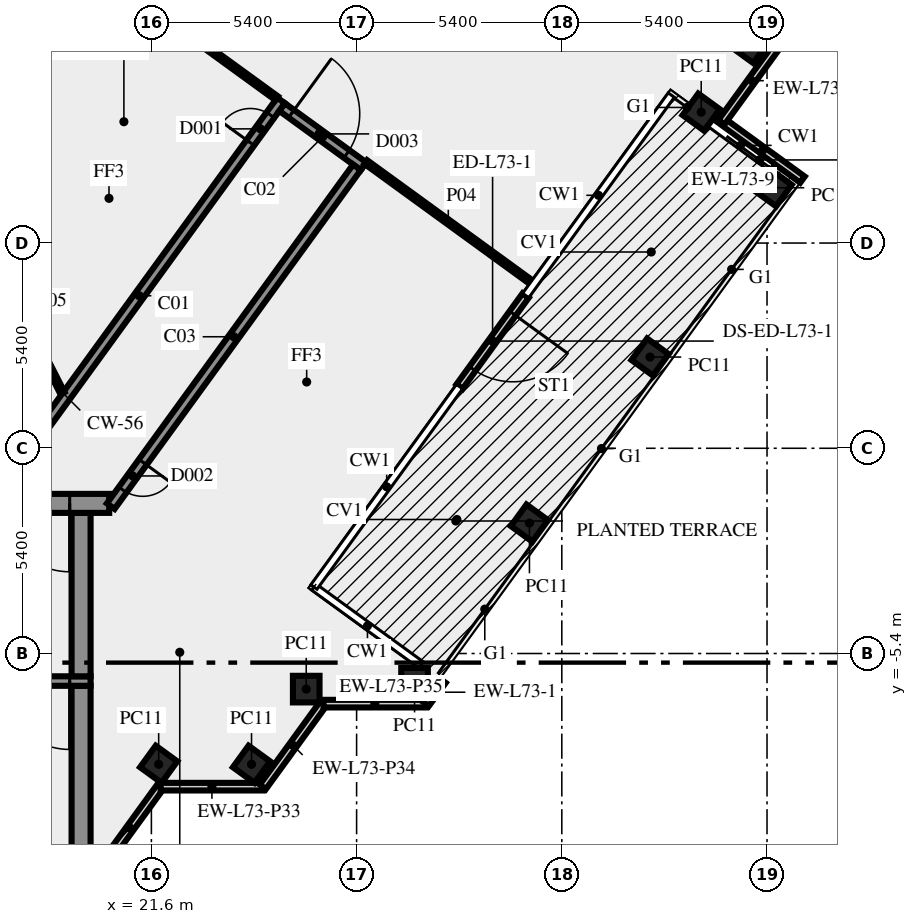
"""IFC4 building model, lengths in metres.
Left out: names, types, materials, properties, quantities, classifications, styles, units other than length and angle.
Written with IfcOpenShell. Run it as: python <this file> out.ifc"""

import sys

from ifc_helpers import new_model, si_unit, direction, frame, frame_2d, origin, origin_2d, place, context, subcontext, project, spatial, rectangle, extrude, element, fill, save


model = new_model("IFC4")
c1 = context("Model", 3, precision=1e-05, world=origin(), true_north=direction((0.0, 1.0)))
c2 = subcontext(c1, "Body", "Model", "MODEL_VIEW")
j1 = project(units=[si_unit("LENGTHUNIT", "METRE"), si_unit("PLANEANGLEUNIT", "RADIAN")], contexts=[c1])
p1 = place(None, origin())
s1 = spatial("IfcSite", under=j1, at=p1, CompositionType="ELEMENT")
p2 = place(p1, origin())
s2 = spatial("IfcBuilding", under=s1, at=p2, CompositionType="ELEMENT")
p3 = place(p2, frame((0.0, 0.0, 315.0)))
s3 = spatial("IfcBuildingStorey", under=s2, at=p3, CompositionType="ELEMENT", Elevation=315.0)
for number, where, z_axis, x_axis in (
    (1, (21.792, -8.315, 0.0), (0.0, 0.0, 1.0), (0.588, 0.809, 0.0)),
    (2, (24.235, -8.315, 0.0), (0.0, 0.0, 1.0), (0.588, 0.809, 0.0)),
    (3, (25.674, -6.337, 0.0), (0.0, 0.0, 1.0), (1.0, 0.0, 0.0)),
    (4, (28.525, -6.13, 0.0), (0.0, 0.0, 1.0), (1.0, 0.0, 0.0)),
    (5, (31.548, -1.969, 0.0), (0.0, 0.0, 1.0), (0.588, 0.809, 0.0)),
    (6, (34.722, 2.4, 0.0), (0.0, 0.0, 1.0), (0.588, 0.809, 0.0)),
    (7, (37.96, 6.855, 0.0), (0.0, 0.0, 1.0), (0.588, 0.809, 0.0)),
    (8, (36.068, 8.844, 0.0), (0.0, 0.0, 1.0), (0.588, 0.809, 0.0)),
    (9, (37.36, 10.625, 0.0), (0.0, 0.0, 1.0), (0.588, 0.809, 0.0)),
):
    element("IfcColumn", number, at=place(p3, frame(where, z_axis=z_axis, x_axis=x_axis)), inside=s3, PredefinedType="COLUMN", context=c2, shape_type="SweptSolid", body=[
        extrude(rectangle(XDim=0.7, YDim=0.7, at=origin_2d()), origin(), (0.0, 0.0, 1.0), 3.65),
    ])
p4 = place(p3, frame((20.253, -11.083, 0.0), z_axis=(0.0, 0.0, 1.0), x_axis=(0.587766567315, 0.809030569476, 0.0)))
e10 = element("IfcWall", 10, at=p4, inside=s3, PredefinedType="SOLIDWALL", context=c2, shape_type="SweptSolid", body=[
    extrude(rectangle(XDim=2.688, YDim=0.2, at=frame_2d((1.344, 0.0))), origin(), (0.0, 0.0, 1.0), 3.65),
])
p5 = place(p3, frame((21.843, -8.904, 0.0), z_axis=(0.0, 0.0, 1.0), x_axis=(1.0, 0.0, 0.0)))
e11 = element("IfcWall", 11, at=p5, inside=s3, PredefinedType="SOLIDWALL", context=c2, shape_type="SweptSolid", body=[
    extrude(rectangle(XDim=2.7, YDim=0.2, at=frame_2d((1.35, 0.0))), origin(), (0.0, 0.0, 1.0), 3.65),
])
p6 = place(p3, frame((24.533, -8.909, 0.0), z_axis=(0.0, 0.0, 1.0), x_axis=(0.587720002413, 0.809064397168, 0.0)))
e12 = element("IfcWall", 12, at=p6, inside=s3, PredefinedType="SOLIDWALL", context=c2, shape_type="SweptSolid", body=[
    extrude(rectangle(XDim=2.7, YDim=0.2, at=frame_2d((1.35, 0.0))), origin(), (0.0, 0.0, 1.0), 3.65),
])
p7 = place(p3, frame((26.13, -6.719, 0.0), z_axis=(0.0, 0.0, 1.0), x_axis=(1.0, 0.0, 0.0)))
e13 = element("IfcWall", 13, at=p7, inside=s3, PredefinedType="SOLIDWALL", context=c2, shape_type="SweptSolid", body=[
    extrude(rectangle(XDim=2.7, YDim=0.2, at=frame_2d((1.35, 0.0))), origin(), (0.0, 0.0, 1.0), 3.65),
])
p8 = place(p3, frame((28.82, -6.724, 0.0), z_axis=(0.0, 0.0, 1.0), x_axis=(0.587941177097, 0.808903685412, 0.0)))
e14 = element("IfcWall", 14, at=p8, inside=s3, PredefinedType="SOLIDWALL", context=c2, shape_type="SweptSolid", body=[
    extrude(rectangle(XDim=0.756, YDim=0.2, at=frame_2d((0.378, 0.0))), origin(), (0.0, 0.0, 1.0), 3.65),
])
p9 = place(p3, frame((31.449, 4.019, 0.0), z_axis=(0.0, 0.0, 1.0), x_axis=(-0.58782869016, -0.808985433135, 0.0)))
e15 = element("IfcWall", 15, at=p9, inside=s3, PredefinedType="SOLIDWALL", context=c2, shape_type="SweptSolid", body=[
    extrude(rectangle(XDim=2.963, YDim=0.2, at=frame_2d((1.481, 0.0))), origin(), (0.0, 0.0, 1.0), 3.65),
])
p10 = place(p9, frame((0.582, 0.0, 0.0)))
e16 = element("IfcOpeningElement", 16, at=p10, cuts=e15, PredefinedType="OPENING", context=c2, shape_type="SweptSolid", body=[
    extrude(rectangle(XDim=1.8, YDim=2.4, at=frame_2d((0.9, 1.2))), frame((0.0, 0.11, 0.0), z_axis=(0.0, -1.0, 0.0), x_axis=(1.0, 0.0, 0.0)), (0.0, 0.0, 1.0), 0.22),
])
p11 = place(p3, frame((38.733, 7.069, 0.0), z_axis=(0.0, 0.0, 1.0), x_axis=(-0.80901210161, 0.587791986546, 0.0)))
e17 = element("IfcWall", 17, at=p11, inside=s3, PredefinedType="SOLIDWALL", context=c2, shape_type="SweptSolid", body=[
    extrude(rectangle(XDim=2.6, YDim=0.2, at=frame_2d((1.3, 0.0))), origin(), (0.0, 0.0, 1.0), 3.65),
])
p12 = place(p3, frame((36.602, 8.58, 0.0), z_axis=(0.0, 0.0, 1.0), x_axis=(0.587822180636, 0.808990163075, 0.0)))
e18 = element("IfcWall", 18, at=p12, inside=s3, PredefinedType="SOLIDWALL", context=c2, shape_type="SweptSolid", body=[
    extrude(rectangle(XDim=2.7, YDim=0.2, at=frame_2d((1.35, 0.0))), origin(), (0.0, 0.0, 1.0), 3.65),
])
p13 = place(p3, frame((19.75, -10.5, 0.0), z_axis=(0.0, 0.0, 1.0), x_axis=(0.0, 1.0, 0.0)))
e19 = element("IfcWall", 19, at=p13, inside=s3, PredefinedType="SHEAR", context=c2, shape_type="SweptSolid", body=[
    extrude(rectangle(XDim=4.25, YDim=0.5, at=frame_2d((2.125, 0.0))), origin(), (0.0, 0.0, 1.0), 3.65),
])
p14 = place(p3, frame((20.0, -6.125, 0.0), z_axis=(0.0, 0.0, 1.0), x_axis=(-1.0, 0.0, 0.0)))
e20 = element("IfcWall", 20, at=p14, inside=s3, PredefinedType="SHEAR", context=c2, shape_type="SweptSolid", body=[
    extrude(rectangle(XDim=10.2, YDim=0.25, at=frame_2d((5.1, 0.0))), origin(), (0.0, 0.0, 1.0), 3.65),
])
p15 = place(p14, frame((0.55, 0.0, 0.0)))
e21 = element("IfcOpeningElement", 21, at=p15, cuts=e20, PredefinedType="OPENING", context=c2, shape_type="SweptSolid", body=[
    extrude(rectangle(XDim=1.8, YDim=2.1, at=frame_2d((0.9, 1.05))), frame((0.0, 0.135, 0.0), z_axis=(0.0, -1.0, 0.0), x_axis=(1.0, 0.0, 0.0)), (0.0, 0.0, 1.0), 0.27),
])
p16 = place(p3, frame((19.75, -6.0, 0.0), z_axis=(0.0, 0.0, 1.0), x_axis=(0.0, 1.0, 0.0)))
e22 = element("IfcWall", 22, at=p16, inside=s3, PredefinedType="SHEAR", context=c2, shape_type="SweptSolid", body=[
    extrude(rectangle(XDim=4.3, YDim=0.5, at=frame_2d((2.15, 0.0))), origin(), (0.0, 0.0, 1.0), 3.65),
])
p17 = place(p3, frame((20.49, -1.45, 0.0), z_axis=(0.0, 0.0, 1.0), x_axis=(-1.0, 0.0, 0.0)))
e23 = element("IfcWall", 23, at=p17, inside=s3, PredefinedType="SHEAR", context=c2, shape_type="SweptSolid", body=[
    extrude(rectangle(XDim=40.98, YDim=0.5, at=frame_2d((20.49, 0.0))), origin(), (0.0, 0.0, 1.0), 3.65),
])
p18 = place(p17, frame((38.14, 0.0, 0.0)))
e24 = element("IfcOpeningElement", 24, at=p18, cuts=e23, PredefinedType="OPENING", context=c2, shape_type="SweptSolid", body=[
    extrude(rectangle(XDim=1.8, YDim=2.1, at=frame_2d((0.9, 1.05))), frame((0.0, 0.26, 0.0), z_axis=(0.0, -1.0, 0.0), x_axis=(1.0, 0.0, 0.0)), (0.0, 0.0, 1.0), 0.52),
])
p19 = place(p17, frame((35.89, 0.0, 0.0)))
e25 = element("IfcOpeningElement", 25, at=p19, cuts=e23, PredefinedType="OPENING", context=c2, shape_type="SweptSolid", body=[
    extrude(rectangle(XDim=0.9, YDim=2.1, at=frame_2d((0.45, 1.05))), frame((0.0, 0.26, 0.0), z_axis=(0.0, -1.0, 0.0), x_axis=(1.0, 0.0, 0.0)), (0.0, 0.0, 1.0), 0.52),
])
p20 = place(p17, frame((32.94, 0.0, 0.0)))
e26 = element("IfcOpeningElement", 26, at=p20, cuts=e23, PredefinedType="OPENING", context=c2, shape_type="SweptSolid", body=[
    extrude(rectangle(XDim=0.9, YDim=2.1, at=frame_2d((0.45, 1.05))), frame((0.0, 0.26, 0.0), z_axis=(0.0, -1.0, 0.0), x_axis=(1.0, 0.0, 0.0)), (0.0, 0.0, 1.0), 0.52),
])
p21 = place(p17, frame((31.015, 0.0, 0.0)))
e27 = element("IfcOpeningElement", 27, at=p21, cuts=e23, PredefinedType="OPENING", context=c2, shape_type="SweptSolid", body=[
    extrude(rectangle(XDim=0.8, YDim=2.1, at=frame_2d((0.4, 1.05))), frame((0.0, 0.26, 0.0), z_axis=(0.0, -1.0, 0.0), x_axis=(1.0, 0.0, 0.0)), (0.0, 0.0, 1.0), 0.52),
])
p22 = place(p17, frame((24.765, 0.0, 0.0)))
e28 = element("IfcOpeningElement", 28, at=p22, cuts=e23, PredefinedType="OPENING", context=c2, shape_type="SweptSolid", body=[
    extrude(rectangle(XDim=0.8, YDim=2.1, at=frame_2d((0.4, 1.05))), frame((0.0, 0.26, 0.0), z_axis=(0.0, -1.0, 0.0), x_axis=(1.0, 0.0, 0.0)), (0.0, 0.0, 1.0), 0.52),
])
p23 = place(p17, frame((21.765, 0.0, 0.0)))
e29 = element("IfcOpeningElement", 29, at=p23, cuts=e23, PredefinedType="OPENING", context=c2, shape_type="SweptSolid", body=[
    extrude(rectangle(XDim=2.0, YDim=2.1, at=frame_2d((1.0, 1.05))), frame((0.0, 0.26, 0.0), z_axis=(0.0, -1.0, 0.0), x_axis=(1.0, 0.0, 0.0)), (0.0, 0.0, 1.0), 0.52),
])
p24 = place(p17, frame((12.24, 0.0, 0.0)))
e30 = element("IfcOpeningElement", 30, at=p24, cuts=e23, PredefinedType="OPENING", context=c2, shape_type="SweptSolid", body=[
    extrude(rectangle(XDim=0.9, YDim=2.1, at=frame_2d((0.45, 1.05))), frame((0.0, 0.26, 0.0), z_axis=(0.0, -1.0, 0.0), x_axis=(1.0, 0.0, 0.0)), (0.0, 0.0, 1.0), 0.52),
])
p25 = place(p17, frame((7.14, 0.0, 0.0)))
e31 = element("IfcOpeningElement", 31, at=p25, cuts=e23, PredefinedType="OPENING", context=c2, shape_type="SweptSolid", body=[
    extrude(rectangle(XDim=0.9, YDim=2.1, at=frame_2d((0.45, 1.05))), frame((0.0, 0.26, 0.0), z_axis=(0.0, -1.0, 0.0), x_axis=(1.0, 0.0, 0.0)), (0.0, 0.0, 1.0), 0.52),
])
p26 = place(p17, frame((5.028, 0.0, 0.0)))
e32 = element("IfcOpeningElement", 32, at=p26, cuts=e23, PredefinedType="OPENING", context=c2, shape_type="SweptSolid", body=[
    extrude(rectangle(XDim=0.8, YDim=2.1, at=frame_2d((0.4, 1.05))), frame((0.0, 0.26, 0.0), z_axis=(0.0, -1.0, 0.0), x_axis=(1.0, 0.0, 0.0)), (0.0, 0.0, 1.0), 0.52),
])
p27 = place(p17, frame((3.452, 0.0, 0.0)))
e33 = element("IfcOpeningElement", 33, at=p27, cuts=e23, PredefinedType="OPENING", context=c2, shape_type="SweptSolid", body=[
    extrude(rectangle(XDim=0.8, YDim=2.1, at=frame_2d((0.4, 1.05))), frame((0.0, 0.26, 0.0), z_axis=(0.0, -1.0, 0.0), x_axis=(1.0, 0.0, 0.0)), (0.0, 0.0, 1.0), 0.52),
])
p28 = place(p17, frame((1.04, 0.0, 0.0)))
e34 = element("IfcOpeningElement", 34, at=p28, cuts=e23, PredefinedType="OPENING", context=c2, shape_type="SweptSolid", body=[
    extrude(rectangle(XDim=1.8, YDim=2.1, at=frame_2d((0.9, 1.05))), frame((0.0, 0.26, 0.0), z_axis=(0.0, -1.0, 0.0), x_axis=(1.0, 0.0, 0.0)), (0.0, 0.0, 1.0), 0.52),
])
p29 = place(p3, frame((17.545, -1.125, 0.0), z_axis=(0.0, 0.0, 1.0), x_axis=(0.587796810203, 0.809008596935, 0.0)))
e35 = element("IfcWall", 35, at=p29, inside=s3, PredefinedType="SOLIDWALL", context=c2, shape_type="SweptSolid", body=[
    extrude(rectangle(XDim=12.703, YDim=0.25, at=frame_2d((6.352, 0.0))), origin(), (0.0, 0.0, 1.0), 3.65),
])
p30 = place(p29, frame((11.329, 0.0, 0.0)))
e36 = element("IfcOpeningElement", 36, at=p30, cuts=e35, PredefinedType="OPENING", context=c2, shape_type="SweptSolid", body=[
    extrude(rectangle(XDim=0.9, YDim=2.1, at=frame_2d((0.45, 1.05))), frame((0.0, 0.135, 0.0), z_axis=(0.0, -1.0, 0.0), x_axis=(1.0, 0.0, 0.0)), (0.0, 0.0, 1.0), 0.27),
])
p31 = place(p3, frame((25.039, 8.978, 0.0), z_axis=(0.0, 0.0, 1.0), x_axis=(0.809006914995, -0.587799125119, 0.0)))
e37 = element("IfcWall", 37, at=p31, inside=s3, PredefinedType="SOLIDWALL", context=c2, shape_type="SweptSolid", body=[
    extrude(rectangle(XDim=2.65, YDim=0.25, at=frame_2d((1.325, 0.0))), origin(), (0.0, 0.0, 1.0), 3.65),
])
p32 = place(p31, frame((0.301, 0.0, 0.0)))
e38 = element("IfcOpeningElement", 38, at=p32, cuts=e37, PredefinedType="OPENING", context=c2, shape_type="SweptSolid", body=[
    extrude(rectangle(XDim=1.8, YDim=2.1, at=frame_2d((0.9, 1.05))), frame((0.0, 0.135, 0.0), z_axis=(0.0, -1.0, 0.0), x_axis=(1.0, 0.0, 0.0)), (0.0, 0.0, 1.0), 0.27),
])
p33 = place(p3, frame((27.009, 7.392, 0.0), z_axis=(0.0, 0.0, 1.0), x_axis=(-0.587776457057, -0.809023384414, 0.0)))
e39 = element("IfcWall", 39, at=p33, inside=s3, PredefinedType="SOLIDWALL", context=c2, shape_type="SweptSolid", body=[
    extrude(rectangle(XDim=11.021, YDim=0.25, at=frame_2d((5.51, 0.0))), origin(), (0.0, 0.0, 1.0), 3.65),
])
p34 = place(p33, frame((9.588, 0.0, 0.0)))
e40 = element("IfcOpeningElement", 40, at=p34, cuts=e39, PredefinedType="OPENING", context=c2, shape_type="SweptSolid", body=[
    extrude(rectangle(XDim=0.9, YDim=2.1, at=frame_2d((0.45, 1.05))), frame((0.0, 0.135, 0.0), z_axis=(0.0, -1.0, 0.0), x_axis=(1.0, 0.0, 0.0)), (0.0, 0.0, 1.0), 0.27),
])
p35 = place(p3, frame((24.898, 9.21, 0.0), z_axis=(0.0, 0.0, 1.0), x_axis=(-0.809034479891, 0.587761184791, 0.0)))
e41 = element("IfcWall", 41, at=p35, inside=s3, PredefinedType="PARTITIONING", context=c2, shape_type="SweptSolid", body=[
    extrude(rectangle(XDim=9.55, YDim=0.12, at=frame_2d((4.775, 0.0))), origin(), (0.0, 0.0, 1.0), 2.95),
])
p36 = place(p3, frame((27.241, 7.532, 0.0), z_axis=(0.0, 0.0, 1.0), x_axis=(0.809040727879, -0.587752584539, 0.0)))
e42 = element("IfcWall", 42, at=p36, inside=s3, PredefinedType="PARTITIONING", context=c2, shape_type="SweptSolid", body=[
    extrude(rectangle(XDim=5.37, YDim=0.12, at=frame_2d((2.685, 0.0))), origin(), (0.0, 0.0, 1.0), 3.65),
])
p37 = place(p3, frame((18.0, 3.925, 0.0), z_axis=(0.0, 0.0, 1.0), x_axis=(0.453950796792, -0.891026752736, 0.0)))
e43 = element("IfcWall", 43, at=p37, inside=s3, PredefinedType="PARTITIONING", context=c2, shape_type="SweptSolid", body=[
    extrude(rectangle(XDim=2.778, YDim=0.12, at=frame_2d((1.389, 0.0))), origin(), (0.0, 0.0, 1.0), 3.65),
])
p38 = place(p10, origin())
e44 = element("IfcDoor", 44, at=p38, inside=s3, OperationType="DOUBLE_DOOR_SINGLE_SWING", PredefinedType="DOOR", context=c2, shape_type="SweptSolid", body=[
    extrude(rectangle(XDim=1.8, YDim=2.4, at=frame_2d((0.9, 1.2))), frame((0.0, 0.025, 0.0), z_axis=(0.0, -1.0, 0.0), x_axis=(1.0, 0.0, 0.0)), (0.0, 0.0, 1.0), 0.05),
])
fill(e16, e44)
p39 = place(p15, origin())
e45 = element("IfcDoor", 45, at=p39, inside=s3, OperationType="DOUBLE_DOOR_SINGLE_SWING", PredefinedType="DOOR", context=c2, shape_type="SweptSolid", body=[
    extrude(rectangle(XDim=1.8, YDim=2.1, at=frame_2d((0.9, 1.05))), frame((0.0, 0.025, 0.0), z_axis=(0.0, -1.0, 0.0), x_axis=(1.0, 0.0, 0.0)), (0.0, 0.0, 1.0), 0.05),
])
fill(e21, e45)
p40 = place(p28, origin())
e46 = element("IfcDoor", 46, at=p40, inside=s3, OperationType="DOUBLE_DOOR_SINGLE_SWING", PredefinedType="DOOR", context=c2, shape_type="SweptSolid", body=[
    extrude(rectangle(XDim=1.8, YDim=2.1, at=frame_2d((0.9, 1.05))), frame((0.0, 0.025, 0.0), z_axis=(0.0, -1.0, 0.0), x_axis=(1.0, 0.0, 0.0)), (0.0, 0.0, 1.0), 0.05),
])
fill(e34, e46)
p41 = place(p30, origin())
e47 = element("IfcDoor", 47, at=p41, inside=s3, OperationType="SINGLE_SWING_RIGHT", PredefinedType="DOOR", context=c2, shape_type="SweptSolid", body=[
    extrude(rectangle(XDim=0.9, YDim=2.1, at=frame_2d((0.45, 1.05))), frame((0.0, 0.025, 0.0), z_axis=(0.0, -1.0, 0.0), x_axis=(1.0, 0.0, 0.0)), (0.0, 0.0, 1.0), 0.05),
])
fill(e36, e47)
p42 = place(p32, origin())
e48 = element("IfcDoor", 48, at=p42, inside=s3, OperationType="DOUBLE_DOOR_SINGLE_SWING", PredefinedType="DOOR", context=c2, shape_type="SweptSolid", body=[
    extrude(rectangle(XDim=1.8, YDim=2.1, at=frame_2d((0.9, 1.05))), frame((0.0, 0.025, 0.0), z_axis=(0.0, -1.0, 0.0), x_axis=(1.0, 0.0, 0.0)), (0.0, 0.0, 1.0), 0.05),
])
fill(e38, e48)
p43 = place(p34, origin())
e49 = element("IfcDoor", 49, at=p43, inside=s3, OperationType="SINGLE_SWING_RIGHT", PredefinedType="DOOR", context=c2, shape_type="SweptSolid", body=[
    extrude(rectangle(XDim=0.9, YDim=2.1, at=frame_2d((0.45, 1.05))), frame((0.0, 0.025, 0.0), z_axis=(0.0, -1.0, 0.0), x_axis=(1.0, 0.0, 0.0)), (0.0, 0.0, 1.0), 0.05),
])
fill(e40, e49)
save(model, sys.argv[1])
